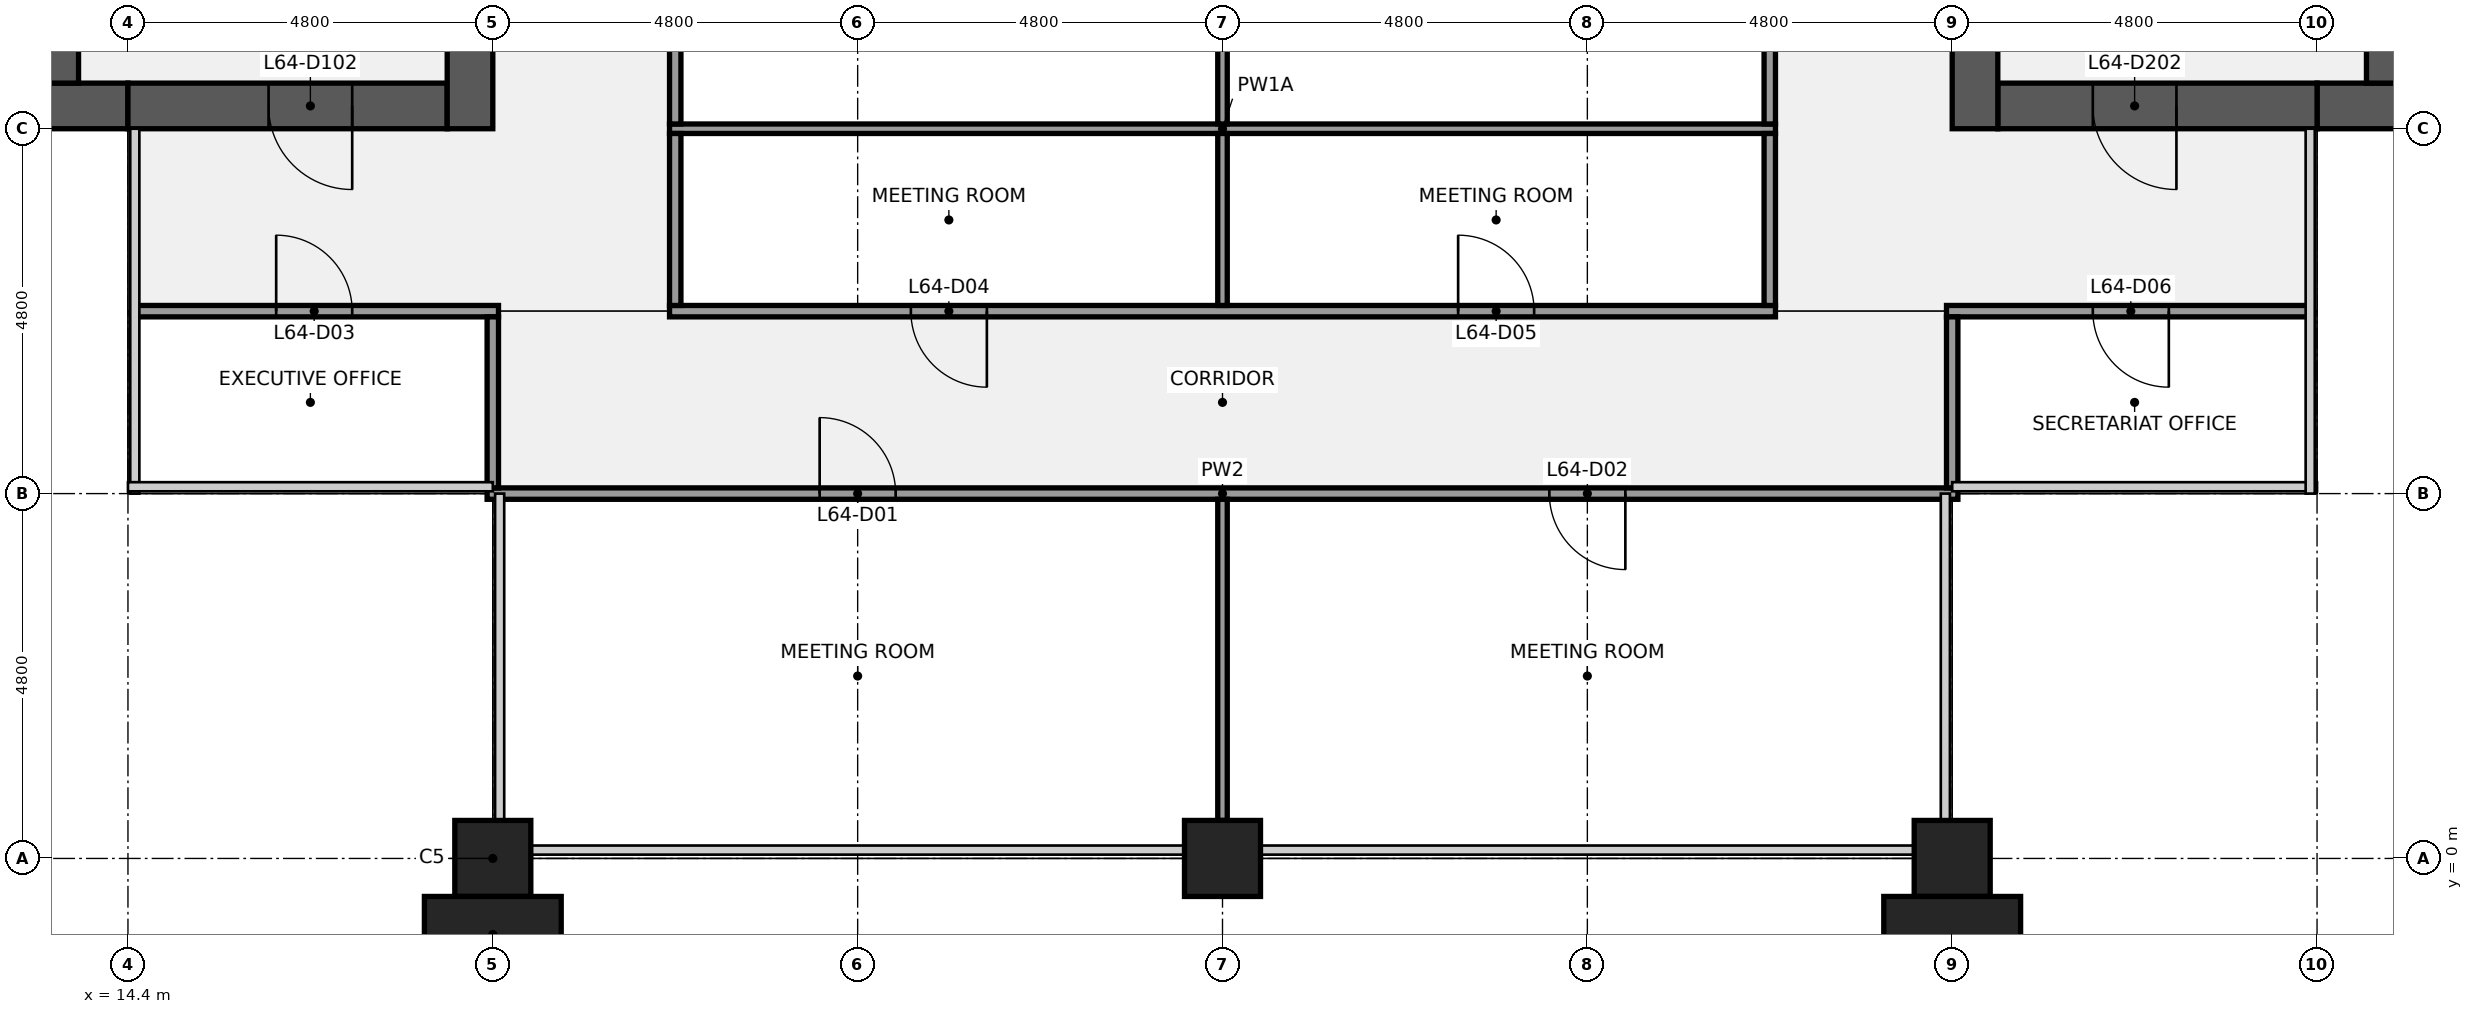
"""IFC4 building model, lengths in metres.
Left out: names, types, materials, properties, quantities, classifications, styles, units other than length and angle.
Written with IfcOpenShell. Run it as: python <this file> out.ifc"""

import sys

from ifc_helpers import new_model, si_unit, direction, frame, frame_2d, origin, origin_2d, place, context, subcontext, project, spatial, rectangle, extrude, element, fill, save


model = new_model("IFC4")
c1 = context("Model", 3, precision=1e-05, world=origin(), true_north=direction((0.0, 1.0)))
c2 = subcontext(c1, "Body", "Model", "MODEL_VIEW")
j1 = project(units=[si_unit("LENGTHUNIT", "METRE"), si_unit("PLANEANGLEUNIT", "RADIAN")], contexts=[c1])
p1 = place(None, origin())
s1 = spatial("IfcSite", under=j1, at=p1, CompositionType="ELEMENT")
p2 = place(p1, origin())
s2 = spatial("IfcBuilding", under=s1, at=p2, CompositionType="ELEMENT")
p3 = place(p2, frame((0.0, 0.0, 294.3)))
s3 = spatial("IfcBuildingStorey", under=s2, at=p3, CompositionType="ELEMENT", Elevation=294.3)
for number, where, z_axis, x_axis in (
    (1, (19.2, 0.0, 0.0), (0.0, 0.0, 1.0), (1.0, 0.0, 0.0)),
    (2, (28.8, 0.0, 0.0), (0.0, 0.0, 1.0), (1.0, 0.0, 0.0)),
    (3, (38.4, 0.0, 0.0), (0.0, 0.0, 1.0), (1.0, 0.0, 0.0)),
):
    element("IfcColumn", number, at=place(p3, frame(where, z_axis=z_axis, x_axis=x_axis)), inside=s3, PredefinedType="COLUMN", context=c2, shape_type="SweptSolid", body=[
        extrude(rectangle(XDim=1.0, YDim=1.0, at=origin_2d()), origin(), (0.0, 0.0, 1.0), 4.0),
    ])
p4 = place(p3, frame((14.4, 9.9, 0.0), z_axis=(0.0, 0.0, 1.0), x_axis=(-1.0, 0.0, 0.0)))
e4 = element("IfcWall", 4, at=p4, inside=s3, PredefinedType="SHEAR", context=c2, shape_type="SweptSolid", body=[
    extrude(rectangle(XDim=13.8, YDim=0.6, at=frame_2d((6.9, 0.0))), origin(), (0.0, 0.0, 1.0), 3.84),
])
p5 = place(p4, frame((6.3, 0.0, 0.9)))
e5 = element("IfcOpeningElement", 5, at=p5, cuts=e4, PredefinedType="OPENING", context=c2, shape_type="SweptSolid", body=[
    extrude(rectangle(XDim=1.8, YDim=1.5, at=frame_2d((0.9, 0.75))), frame((0.0, 0.31, 0.0), z_axis=(0.0, -1.0, 0.0), x_axis=(1.0, 0.0, 0.0)), (0.0, 0.0, 1.0), 0.62),
])
p6 = place(p4, frame((1.5, 0.0, 0.9)))
e6 = element("IfcOpeningElement", 6, at=p6, cuts=e4, PredefinedType="OPENING", context=c2, shape_type="SweptSolid", body=[
    extrude(rectangle(XDim=1.8, YDim=1.5, at=frame_2d((0.9, 0.75))), frame((0.0, 0.31, 0.0), z_axis=(0.0, -1.0, 0.0), x_axis=(1.0, 0.0, 0.0)), (0.0, 0.0, 1.0), 0.62),
])
p7 = place(p3, frame((18.6, 9.9, 0.0), z_axis=(0.0, 0.0, 1.0), x_axis=(-1.0, 0.0, 0.0)))
e7 = element("IfcWall", 7, at=p7, inside=s3, PredefinedType="SHEAR", context=c2, shape_type="SweptSolid", body=[
    extrude(rectangle(XDim=4.2, YDim=0.6, at=frame_2d((2.1, 0.0))), origin(), (0.0, 0.0, 1.0), 3.84),
])
p8 = place(p7, frame((1.25, 0.0, 0.0)))
e8 = element("IfcOpeningElement", 8, at=p8, cuts=e7, PredefinedType="OPENING", context=c2, shape_type="SweptSolid", body=[
    extrude(rectangle(XDim=1.1, YDim=2.1, at=frame_2d((0.55, 1.05))), frame((0.0, 0.31, 0.0), z_axis=(0.0, -1.0, 0.0), x_axis=(1.0, 0.0, 0.0)), (0.0, 0.0, 1.0), 0.62),
])
p9 = place(p3, frame((18.9, 38.4, 0.0), z_axis=(0.0, 0.0, 1.0), x_axis=(0.0, -1.0, 0.0)))
e9 = element("IfcWall", 9, at=p9, inside=s3, PredefinedType="SHEAR", context=c2, shape_type="SweptSolid", body=[
    extrude(rectangle(XDim=28.8, YDim=0.6, at=frame_2d((14.4, 0.0))), origin(), (0.0, 0.0, 1.0), 3.84),
])
p10 = place(p9, frame((18.3, 0.0, 0.0)))
e10 = element("IfcOpeningElement", 10, at=p10, cuts=e9, PredefinedType="OPENING", context=c2, shape_type="SweptSolid", body=[
    extrude(rectangle(XDim=1.8, YDim=2.1, at=frame_2d((0.9, 1.05))), frame((0.0, 0.31, 0.0), z_axis=(0.0, -1.0, 0.0), x_axis=(1.0, 0.0, 0.0)), (0.0, 0.0, 1.0), 0.62),
])
p11 = place(p9, frame((8.7, 0.0, 0.0)))
e11 = element("IfcOpeningElement", 11, at=p11, cuts=e9, PredefinedType="OPENING", context=c2, shape_type="SweptSolid", body=[
    extrude(rectangle(XDim=1.8, YDim=2.1, at=frame_2d((0.9, 1.05))), frame((0.0, 0.31, 0.0), z_axis=(0.0, -1.0, 0.0), x_axis=(1.0, 0.0, 0.0)), (0.0, 0.0, 1.0), 0.62),
])
p12 = place(p3, frame((6.25, 10.5, 0.0), z_axis=(0.0, 0.0, 1.0), x_axis=(1.0, 0.0, 0.0)))
e12 = element("IfcWall", 12, at=p12, inside=s3, PredefinedType="SHEAR", context=c2, shape_type="SweptSolid", body=[
    extrude(rectangle(XDim=7.5, YDim=0.6, at=frame_2d((3.75, 0.0))), origin(), (0.0, 0.0, 1.0), 3.84),
])
p13 = place(p3, frame((57.0, 9.9, 0.0), z_axis=(0.0, 0.0, 1.0), x_axis=(-1.0, 0.0, 0.0)))
e13 = element("IfcWall", 13, at=p13, inside=s3, PredefinedType="SHEAR", context=c2, shape_type="SweptSolid", body=[
    extrude(rectangle(XDim=13.8, YDim=0.6, at=frame_2d((6.9, 0.0))), origin(), (0.0, 0.0, 1.0), 3.84),
])
p14 = place(p13, frame((5.7, 0.0, 0.9)))
e14 = element("IfcOpeningElement", 14, at=p14, cuts=e13, PredefinedType="OPENING", context=c2, shape_type="SweptSolid", body=[
    extrude(rectangle(XDim=1.8, YDim=1.5, at=frame_2d((0.9, 0.75))), frame((0.0, 0.31, 0.0), z_axis=(0.0, -1.0, 0.0), x_axis=(1.0, 0.0, 0.0)), (0.0, 0.0, 1.0), 0.62),
])
p15 = place(p13, frame((10.5, 0.0, 0.9)))
e15 = element("IfcOpeningElement", 15, at=p15, cuts=e13, PredefinedType="OPENING", context=c2, shape_type="SweptSolid", body=[
    extrude(rectangle(XDim=1.8, YDim=1.5, at=frame_2d((0.9, 0.75))), frame((0.0, 0.31, 0.0), z_axis=(0.0, -1.0, 0.0), x_axis=(1.0, 0.0, 0.0)), (0.0, 0.0, 1.0), 0.62),
])
p16 = place(p3, frame((43.2, 9.9, 0.0), z_axis=(0.0, 0.0, 1.0), x_axis=(-1.0, 0.0, 0.0)))
e16 = element("IfcWall", 16, at=p16, inside=s3, PredefinedType="SHEAR", context=c2, shape_type="SweptSolid", body=[
    extrude(rectangle(XDim=4.2, YDim=0.6, at=frame_2d((2.1, 0.0))), origin(), (0.0, 0.0, 1.0), 3.84),
])
p17 = place(p16, frame((1.85, 0.0, 0.0)))
e17 = element("IfcOpeningElement", 17, at=p17, cuts=e16, PredefinedType="OPENING", context=c2, shape_type="SweptSolid", body=[
    extrude(rectangle(XDim=1.1, YDim=2.1, at=frame_2d((0.55, 1.05))), frame((0.0, 0.31, 0.0), z_axis=(0.0, -1.0, 0.0), x_axis=(1.0, 0.0, 0.0)), (0.0, 0.0, 1.0), 0.62),
])
p18 = place(p3, frame((38.7, 9.6, 0.0), z_axis=(0.0, 0.0, 1.0), x_axis=(0.0, 1.0, 0.0)))
e18 = element("IfcWall", 18, at=p18, inside=s3, PredefinedType="SHEAR", context=c2, shape_type="SweptSolid", body=[
    extrude(rectangle(XDim=28.8, YDim=0.6, at=frame_2d((14.4, 0.0))), origin(), (0.0, 0.0, 1.0), 3.84),
])
p19 = place(p18, frame((8.7, 0.0, 0.0)))
e19 = element("IfcOpeningElement", 19, at=p19, cuts=e18, PredefinedType="OPENING", context=c2, shape_type="SweptSolid", body=[
    extrude(rectangle(XDim=1.8, YDim=2.1, at=frame_2d((0.9, 1.05))), frame((0.0, 0.31, 0.0), z_axis=(0.0, -1.0, 0.0), x_axis=(1.0, 0.0, 0.0)), (0.0, 0.0, 1.0), 0.62),
])
p20 = place(p18, frame((18.3, 0.0, 0.0)))
e20 = element("IfcOpeningElement", 20, at=p20, cuts=e18, PredefinedType="OPENING", context=c2, shape_type="SweptSolid", body=[
    extrude(rectangle(XDim=1.8, YDim=2.1, at=frame_2d((0.9, 1.05))), frame((0.0, 0.31, 0.0), z_axis=(0.0, -1.0, 0.0), x_axis=(1.0, 0.0, 0.0)), (0.0, 0.0, 1.0), 0.62),
])
p21 = place(p3, frame((43.85, 10.5, 0.0), z_axis=(0.0, 0.0, 1.0), x_axis=(1.0, 0.0, 0.0)))
e21 = element("IfcWall", 21, at=p21, inside=s3, PredefinedType="SHEAR", context=c2, shape_type="SweptSolid", body=[
    extrude(rectangle(XDim=7.5, YDim=0.6, at=frame_2d((3.75, 0.0))), origin(), (0.0, 0.0, 1.0), 3.84),
])
p22 = place(p3, frame((19.125, 4.8, 0.0), z_axis=(0.0, 0.0, 1.0), x_axis=(1.0, 0.0, 0.0)))
e22 = element("IfcWall", 22, at=p22, inside=s3, PredefinedType="PARTITIONING", context=c2, shape_type="SweptSolid", body=[
    extrude(rectangle(XDim=19.35, YDim=0.15, at=frame_2d((9.675, 0.0))), origin(), (0.0, 0.0, 1.0), 2.87),
])
p23 = place(p22, frame((4.375, 0.0, 0.0)))
e23 = element("IfcOpeningElement", 23, at=p23, cuts=e22, PredefinedType="OPENING", context=c2, shape_type="SweptSolid", body=[
    extrude(rectangle(XDim=1.0, YDim=2.1, at=frame_2d((0.5, 1.05))), frame((0.0, 0.085, 0.0), z_axis=(0.0, -1.0, 0.0), x_axis=(1.0, 0.0, 0.0)), (0.0, 0.0, 1.0), 0.17),
])
p24 = place(p22, frame((13.975, 0.0, 0.0)))
e24 = element("IfcOpeningElement", 24, at=p24, cuts=e22, PredefinedType="OPENING", context=c2, shape_type="SweptSolid", body=[
    extrude(rectangle(XDim=1.0, YDim=2.1, at=frame_2d((0.5, 1.05))), frame((0.0, 0.085, 0.0), z_axis=(0.0, -1.0, 0.0), x_axis=(1.0, 0.0, 0.0)), (0.0, 0.0, 1.0), 0.17),
])
p25 = place(p3, frame((14.5, 7.2, 0.0), z_axis=(0.0, 0.0, 1.0), x_axis=(1.0, 0.0, 0.0)))
e25 = element("IfcWall", 25, at=p25, inside=s3, PredefinedType="PARTITIONING", context=c2, shape_type="SweptSolid", body=[
    extrude(rectangle(XDim=4.775, YDim=0.15, at=frame_2d((2.387, 0.0))), origin(), (0.0, 0.0, 1.0), 2.87),
])
p26 = place(p25, frame((1.85, 0.0, 0.0)))
e26 = element("IfcOpeningElement", 26, at=p26, cuts=e25, PredefinedType="OPENING", context=c2, shape_type="SweptSolid", body=[
    extrude(rectangle(XDim=1.0, YDim=2.1, at=frame_2d((0.5, 1.05))), frame((0.0, 0.085, 0.0), z_axis=(0.0, -1.0, 0.0), x_axis=(1.0, 0.0, 0.0)), (0.0, 0.0, 1.0), 0.17),
])
p27 = place(p3, frame((21.525, 7.2, 0.0), z_axis=(0.0, 0.0, 1.0), x_axis=(1.0, 0.0, 0.0)))
e27 = element("IfcWall", 27, at=p27, inside=s3, PredefinedType="PARTITIONING", context=c2, shape_type="SweptSolid", body=[
    extrude(rectangle(XDim=14.55, YDim=0.15, at=frame_2d((7.275, 0.0))), origin(), (0.0, 0.0, 1.0), 2.87),
])
p28 = place(p27, frame((3.175, 0.0, 0.0)))
e28 = element("IfcOpeningElement", 28, at=p28, cuts=e27, PredefinedType="OPENING", context=c2, shape_type="SweptSolid", body=[
    extrude(rectangle(XDim=1.0, YDim=2.1, at=frame_2d((0.5, 1.05))), frame((0.0, 0.085, 0.0), z_axis=(0.0, -1.0, 0.0), x_axis=(1.0, 0.0, 0.0)), (0.0, 0.0, 1.0), 0.17),
])
p29 = place(p27, frame((10.375, 0.0, 0.0)))
e29 = element("IfcOpeningElement", 29, at=p29, cuts=e27, PredefinedType="OPENING", context=c2, shape_type="SweptSolid", body=[
    extrude(rectangle(XDim=1.0, YDim=2.1, at=frame_2d((0.5, 1.05))), frame((0.0, 0.085, 0.0), z_axis=(0.0, -1.0, 0.0), x_axis=(1.0, 0.0, 0.0)), (0.0, 0.0, 1.0), 0.17),
])
p30 = place(p3, frame((38.325, 7.2, 0.0), z_axis=(0.0, 0.0, 1.0), x_axis=(1.0, 0.0, 0.0)))
e30 = element("IfcWall", 30, at=p30, inside=s3, PredefinedType="PARTITIONING", context=c2, shape_type="SweptSolid", body=[
    extrude(rectangle(XDim=4.775, YDim=0.15, at=frame_2d((2.388, 0.0))), origin(), (0.0, 0.0, 1.0), 2.87),
])
p31 = place(p30, frame((1.925, 0.0, 0.0)))
e31 = element("IfcOpeningElement", 31, at=p31, cuts=e30, PredefinedType="OPENING", context=c2, shape_type="SweptSolid", body=[
    extrude(rectangle(XDim=1.0, YDim=2.1, at=frame_2d((0.5, 1.05))), frame((0.0, 0.085, 0.0), z_axis=(0.0, -1.0, 0.0), x_axis=(1.0, 0.0, 0.0)), (0.0, 0.0, 1.0), 0.17),
])
p32 = place(p3, frame((21.525, 9.6, 0.0), z_axis=(0.0, 0.0, 1.0), x_axis=(1.0, 0.0, 0.0)))
e32 = element("IfcWall", 32, at=p32, inside=s3, PredefinedType="PARTITIONING", context=c2, shape_type="SweptSolid", body=[
    extrude(rectangle(XDim=14.55, YDim=0.125, at=frame_2d((7.275, 0.0))), origin(), (0.0, 0.0, 1.0), 2.87),
])
p33 = place(p3, frame((19.2, 4.875, 0.0), z_axis=(0.0, 0.0, 1.0), x_axis=(0.0, 1.0, 0.0)))
e33 = element("IfcWall", 33, at=p33, inside=s3, PredefinedType="PARTITIONING", context=c2, shape_type="SweptSolid", body=[
    extrude(rectangle(XDim=2.25, YDim=0.15, at=frame_2d((1.125, 0.0))), origin(), (0.0, 0.0, 1.0), 2.87),
])
p34 = place(p3, frame((21.6, 7.275, 0.0), z_axis=(0.0, 0.0, 1.0), x_axis=(0.0, 1.0, 0.0)))
e34 = element("IfcWall", 34, at=p34, inside=s3, PredefinedType="PARTITIONING", context=c2, shape_type="SweptSolid", body=[
    extrude(rectangle(XDim=2.263, YDim=0.15, at=frame_2d((1.131, 0.0))), origin(), (0.0, 0.0, 1.0), 2.87),
])
p35 = place(p3, frame((21.6, 9.663, 0.0), z_axis=(0.0, 0.0, 1.0), x_axis=(0.0, 1.0, 0.0)))
e35 = element("IfcWall", 35, at=p35, inside=s3, PredefinedType="PARTITIONING", context=c2, shape_type="SweptSolid", body=[
    extrude(rectangle(XDim=9.475, YDim=0.15, at=frame_2d((4.737, 0.0))), origin(), (0.0, 0.0, 1.0), 2.87),
])
p36 = place(p35, frame((4.238, 0.0, 0.0)))
e36 = element("IfcOpeningElement", 36, at=p36, cuts=e35, PredefinedType="OPENING", context=c2, shape_type="SweptSolid", body=[
    extrude(rectangle(XDim=1.0, YDim=2.1, at=frame_2d((0.5, 1.05))), frame((0.0, 0.085, 0.0), z_axis=(0.0, -1.0, 0.0), x_axis=(1.0, 0.0, 0.0)), (0.0, 0.0, 1.0), 0.17),
])
p37 = place(p3, frame((28.8, 0.5, 0.0), z_axis=(0.0, 0.0, 1.0), x_axis=(0.0, 1.0, 0.0)))
e37 = element("IfcWall", 37, at=p37, inside=s3, PredefinedType="PARTITIONING", context=c2, shape_type="SweptSolid", body=[
    extrude(rectangle(XDim=4.225, YDim=0.125, at=frame_2d((2.113, 0.0))), origin(), (0.0, 0.0, 1.0), 2.87),
])
p38 = place(p3, frame((28.8, 7.275, 0.0), z_axis=(0.0, 0.0, 1.0), x_axis=(0.0, 1.0, 0.0)))
e38 = element("IfcWall", 38, at=p38, inside=s3, PredefinedType="PARTITIONING", context=c2, shape_type="SweptSolid", body=[
    extrude(rectangle(XDim=2.263, YDim=0.125, at=frame_2d((1.131, 0.0))), origin(), (0.0, 0.0, 1.0), 2.87),
])
p39 = place(p3, frame((28.8, 9.663, 0.0), z_axis=(0.0, 0.0, 1.0), x_axis=(0.0, 1.0, 0.0)))
e39 = element("IfcWall", 39, at=p39, inside=s3, PredefinedType="PARTITIONING", context=c2, shape_type="SweptSolid", body=[
    extrude(rectangle(XDim=9.475, YDim=0.125, at=frame_2d((4.737, 0.0))), origin(), (0.0, 0.0, 1.0), 2.87),
])
p40 = place(p3, frame((36.0, 7.275, 0.0), z_axis=(0.0, 0.0, 1.0), x_axis=(0.0, 1.0, 0.0)))
e40 = element("IfcWall", 40, at=p40, inside=s3, PredefinedType="PARTITIONING", context=c2, shape_type="SweptSolid", body=[
    extrude(rectangle(XDim=2.263, YDim=0.15, at=frame_2d((1.131, 0.0))), origin(), (0.0, 0.0, 1.0), 2.87),
])
p41 = place(p3, frame((36.0, 9.663, 0.0), z_axis=(0.0, 0.0, 1.0), x_axis=(0.0, 1.0, 0.0)))
e41 = element("IfcWall", 41, at=p41, inside=s3, PredefinedType="PARTITIONING", context=c2, shape_type="SweptSolid", body=[
    extrude(rectangle(XDim=9.475, YDim=0.15, at=frame_2d((4.737, 0.0))), origin(), (0.0, 0.0, 1.0), 2.87),
])
p42 = place(p41, frame((4.238, 0.0, 0.0)))
e42 = element("IfcOpeningElement", 42, at=p42, cuts=e41, PredefinedType="OPENING", context=c2, shape_type="SweptSolid", body=[
    extrude(rectangle(XDim=1.0, YDim=2.1, at=frame_2d((0.5, 1.05))), frame((0.0, 0.085, 0.0), z_axis=(0.0, -1.0, 0.0), x_axis=(1.0, 0.0, 0.0)), (0.0, 0.0, 1.0), 0.17),
])
p43 = place(p3, frame((38.4, 4.875, 0.0), z_axis=(0.0, 0.0, 1.0), x_axis=(0.0, 1.0, 0.0)))
e43 = element("IfcWall", 43, at=p43, inside=s3, PredefinedType="PARTITIONING", context=c2, shape_type="SweptSolid", body=[
    extrude(rectangle(XDim=2.25, YDim=0.15, at=frame_2d((1.125, 0.0))), origin(), (0.0, 0.0, 1.0), 2.87),
])
for number, where, z_axis, x_axis in (
    (44, (19.2, -1.0, 0.0), (0.0, 0.0, 1.0), (1.0, 0.0, 0.0)),
    (45, (38.4, -1.0, 0.0), (0.0, 0.0, 1.0), (1.0, 0.0, 0.0)),
):
    element("IfcColumn", number, at=place(p3, frame(where, z_axis=z_axis, x_axis=x_axis)), inside=s3, PredefinedType="PILASTER", context=c2, shape_type="SweptSolid", body=[
        extrude(rectangle(XDim=1.8, YDim=1.0, at=origin_2d()), origin(), (0.0, 0.0, 1.0), 4.0),
    ])
p44 = place(p8, origin())
e46 = element("IfcDoor", 46, at=p44, inside=s3, OperationType="SINGLE_SWING_LEFT", PredefinedType="DOOR", context=c2, shape_type="SweptSolid", body=[
    extrude(rectangle(XDim=1.1, YDim=2.1, at=frame_2d((0.55, 1.05))), frame((0.0, 0.025, 0.0), z_axis=(0.0, -1.0, 0.0), x_axis=(1.0, 0.0, 0.0)), (0.0, 0.0, 1.0), 0.05),
])
fill(e8, e46)
p45 = place(p17, origin())
e47 = element("IfcDoor", 47, at=p45, inside=s3, OperationType="SINGLE_SWING_LEFT", PredefinedType="DOOR", context=c2, shape_type="SweptSolid", body=[
    extrude(rectangle(XDim=1.1, YDim=2.1, at=frame_2d((0.55, 1.05))), frame((0.0, 0.025, 0.0), z_axis=(0.0, -1.0, 0.0), x_axis=(1.0, 0.0, 0.0)), (0.0, 0.0, 1.0), 0.05),
])
fill(e17, e47)
p46 = place(p23, origin())
e48 = element("IfcDoor", 48, at=p46, inside=s3, OperationType="SINGLE_SWING_LEFT", PredefinedType="DOOR", context=c2, shape_type="SweptSolid", body=[
    extrude(rectangle(XDim=1.0, YDim=2.1, at=frame_2d((0.5, 1.05))), frame((0.0, 0.025, 0.0), z_axis=(0.0, -1.0, 0.0), x_axis=(1.0, 0.0, 0.0)), (0.0, 0.0, 1.0), 0.05),
])
fill(e23, e48)
p47 = place(p24, origin())
e49 = element("IfcDoor", 49, at=p47, inside=s3, OperationType="SINGLE_SWING_RIGHT", PredefinedType="DOOR", context=c2, shape_type="SweptSolid", body=[
    extrude(rectangle(XDim=1.0, YDim=2.1, at=frame_2d((0.5, 1.05))), frame((0.0, 0.025, 0.0), z_axis=(0.0, -1.0, 0.0), x_axis=(1.0, 0.0, 0.0)), (0.0, 0.0, 1.0), 0.05),
])
fill(e24, e49)
p48 = place(p26, origin())
e50 = element("IfcDoor", 50, at=p48, inside=s3, OperationType="SINGLE_SWING_LEFT", PredefinedType="DOOR", context=c2, shape_type="SweptSolid", body=[
    extrude(rectangle(XDim=1.0, YDim=2.1, at=frame_2d((0.5, 1.05))), frame((0.0, 0.025, 0.0), z_axis=(0.0, -1.0, 0.0), x_axis=(1.0, 0.0, 0.0)), (0.0, 0.0, 1.0), 0.05),
])
fill(e26, e50)
p49 = place(p28, origin())
e51 = element("IfcDoor", 51, at=p49, inside=s3, OperationType="SINGLE_SWING_RIGHT", PredefinedType="DOOR", context=c2, shape_type="SweptSolid", body=[
    extrude(rectangle(XDim=1.0, YDim=2.1, at=frame_2d((0.5, 1.05))), frame((0.0, 0.025, 0.0), z_axis=(0.0, -1.0, 0.0), x_axis=(1.0, 0.0, 0.0)), (0.0, 0.0, 1.0), 0.05),
])
fill(e28, e51)
p50 = place(p29, origin())
e52 = element("IfcDoor", 52, at=p50, inside=s3, OperationType="SINGLE_SWING_LEFT", PredefinedType="DOOR", context=c2, shape_type="SweptSolid", body=[
    extrude(rectangle(XDim=1.0, YDim=2.1, at=frame_2d((0.5, 1.05))), frame((0.0, 0.025, 0.0), z_axis=(0.0, -1.0, 0.0), x_axis=(1.0, 0.0, 0.0)), (0.0, 0.0, 1.0), 0.05),
])
fill(e29, e52)
p51 = place(p31, origin())
e53 = element("IfcDoor", 53, at=p51, inside=s3, OperationType="SINGLE_SWING_RIGHT", PredefinedType="DOOR", context=c2, shape_type="SweptSolid", body=[
    extrude(rectangle(XDim=1.0, YDim=2.1, at=frame_2d((0.5, 1.05))), frame((0.0, 0.025, 0.0), z_axis=(0.0, -1.0, 0.0), x_axis=(1.0, 0.0, 0.0)), (0.0, 0.0, 1.0), 0.05),
])
fill(e31, e53)
save(model, sys.argv[1])
